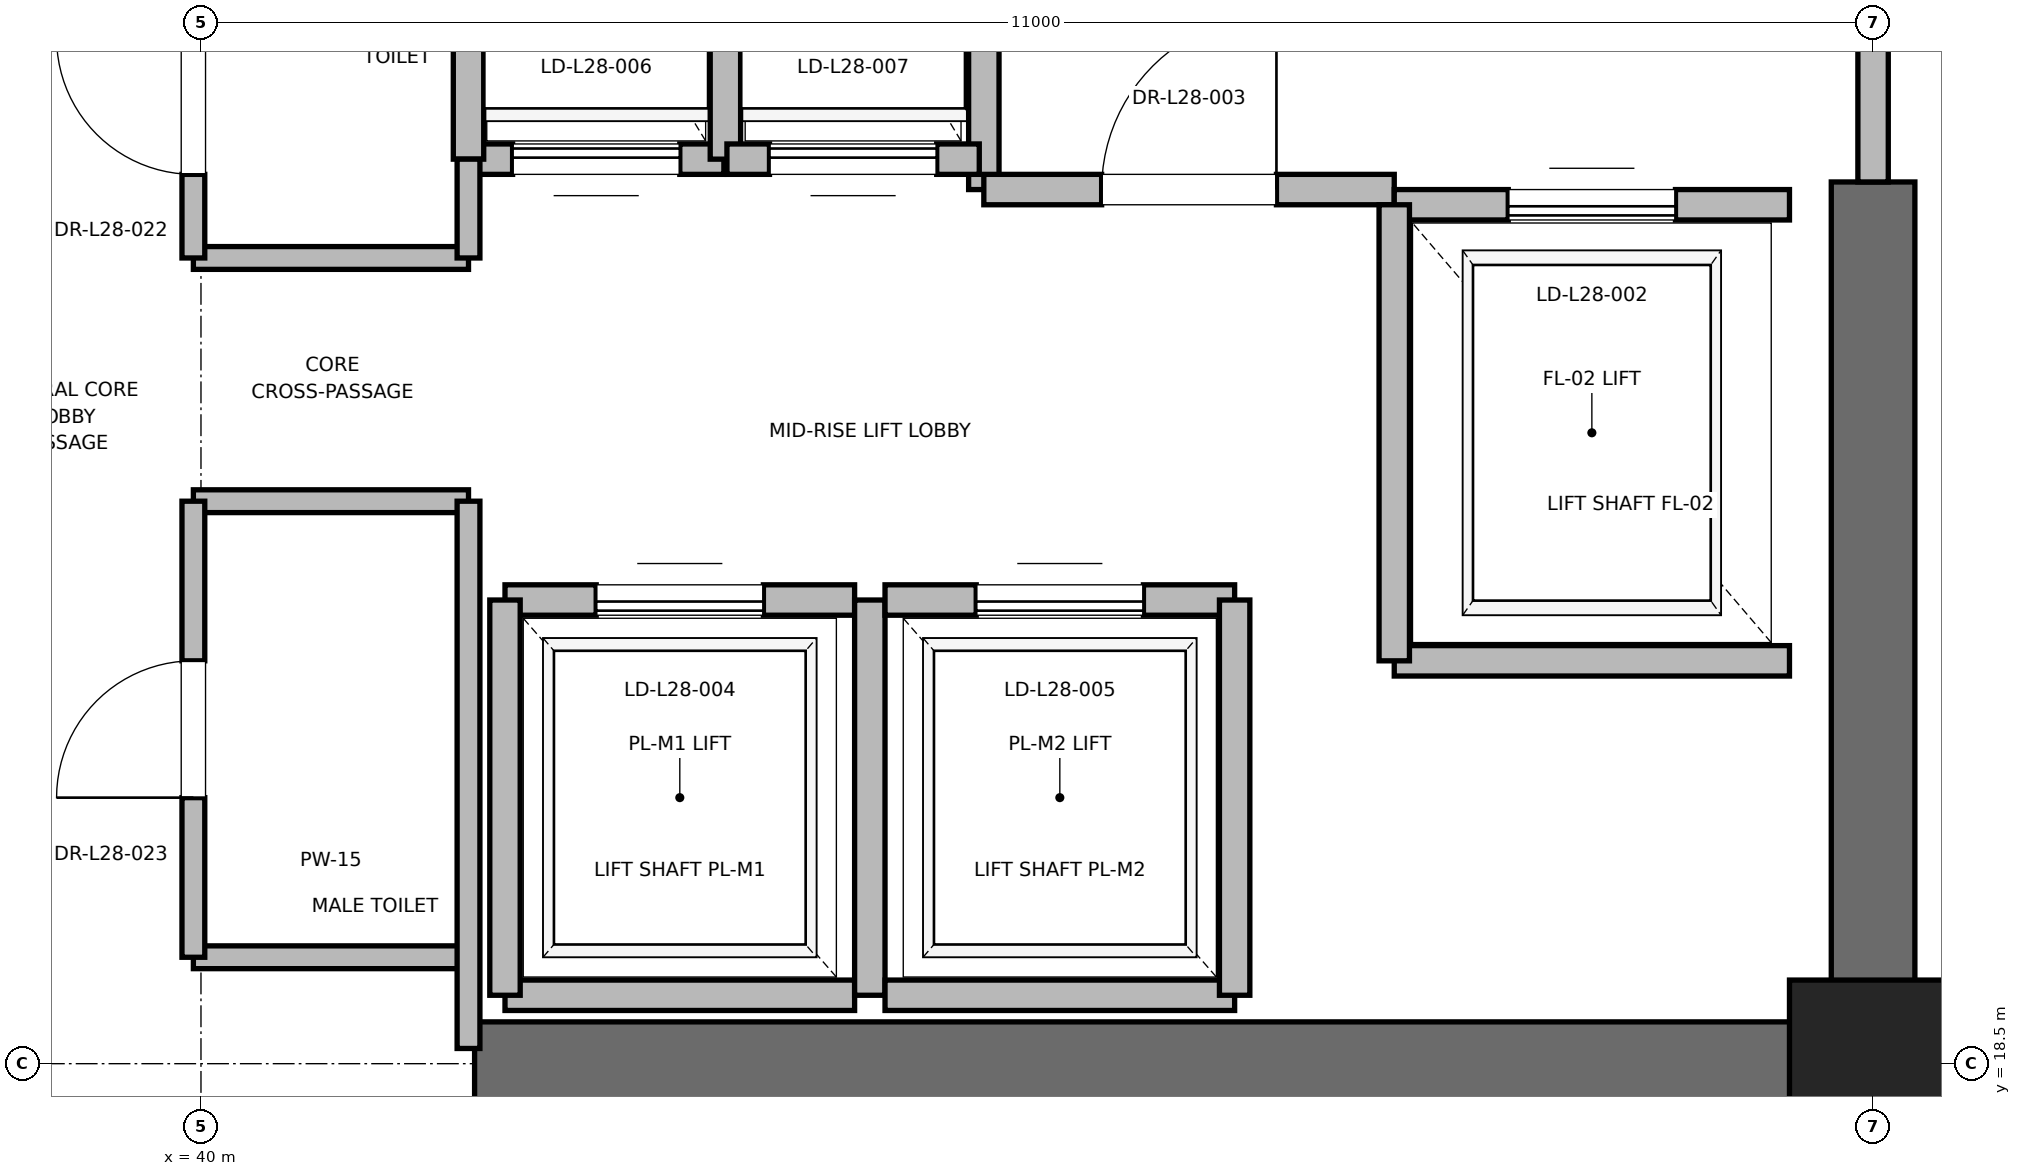
"""IFC4 building model, lengths in metres.
Left out: names, types, materials, properties, quantities, classifications, styles, units other than length and angle.
Written with IfcOpenShell. Run it as: python <this file> out.ifc"""

import sys

from ifc_helpers import new_model, si_unit, direction, frame, frame_2d, origin, origin_2d, place, context, subcontext, project, spatial, rectangle, extrude, element, fill, save


model = new_model("IFC4")
c1 = context("Model", 3, precision=1e-05, world=origin(), true_north=direction((0.0, 1.0)))
c2 = subcontext(c1, "Body", "Model", "MODEL_VIEW")
j1 = project(units=[si_unit("LENGTHUNIT", "METRE"), si_unit("PLANEANGLEUNIT", "RADIAN")], contexts=[c1])
p1 = place(None, origin())
s1 = spatial("IfcSite", under=j1, at=p1, CompositionType="ELEMENT")
p2 = place(p1, origin())
s2 = spatial("IfcBuilding", under=s1, at=p2, CompositionType="ELEMENT")
p3 = place(p2, frame((0.0, 0.0, 123.4)))
s3 = spatial("IfcBuildingStorey", under=s2, at=p3, CompositionType="ELEMENT", Elevation=123.4)
p4 = place(p3, frame((51.0, 18.5, 0.0), z_axis=(0.0, 0.0, 1.0), x_axis=(1.0, 0.0, 0.0)))
e1 = element("IfcColumn", 1, at=p4, inside=s3, PredefinedType="PILASTER", context=c2, shape_type="SweptSolid", body=[
    extrude(rectangle(XDim=1.1, YDim=1.1, at=origin_2d()), origin(), (0.0, 0.0, 1.0), 5.0),
])
p5 = place(p3, frame((41.8, 18.5, 0.0), z_axis=(0.0, 0.0, 1.0), x_axis=(1.0, 0.0, 0.0)))
e2 = element("IfcWall", 2, at=p5, inside=s3, PredefinedType="SHEAR", context=c2, shape_type="SweptSolid", body=[
    extrude(rectangle(XDim=9.2, YDim=0.55, at=frame_2d((4.6, 0.0))), origin(), (0.0, 0.0, 1.0), 4.775),
])
p6 = place(p3, frame((51.0, 18.5, 0.0), z_axis=(0.0, 0.0, 1.0), x_axis=(0.0, 1.0, 0.0)))
e3 = element("IfcWall", 3, at=p6, inside=s3, PredefinedType="SHEAR", context=c2, shape_type="SweptSolid", body=[
    extrude(rectangle(XDim=5.8, YDim=0.55, at=frame_2d((2.9, 0.0))), origin(), (0.0, 0.0, 1.0), 4.775),
])
p7 = place(p3, frame((45.15, 24.25, 0.0), z_axis=(0.0, 0.0, 1.0), x_axis=(0.0, 1.0, 0.0)))
e4 = element("IfcWall", 4, at=p7, inside=s3, PredefinedType="PARTITIONING", context=c2, shape_type="SweptSolid", body=[
    extrude(rectangle(XDim=3.37, YDim=0.2, at=frame_2d((1.685, 0.0))), origin(), (0.0, 0.0, 1.0), 4.775),
])
p8 = place(p3, frame((45.15, 24.25, 0.0), z_axis=(0.0, 0.0, 1.0), x_axis=(1.0, 0.0, 0.0)))
e5 = element("IfcWall", 5, at=p8, inside=s3, PredefinedType="PARTITIONING", context=c2, shape_type="SweptSolid", body=[
    extrude(rectangle(XDim=2.7, YDim=0.2, at=frame_2d((1.35, 0.0))), origin(), (0.0, 0.0, 1.0), 4.775),
])
p9 = place(p8, frame((0.775, 0.0, 0.0)))
e6 = element("IfcOpeningElement", 6, at=p9, cuts=e5, PredefinedType="OPENING", context=c2, shape_type="SweptSolid", body=[
    extrude(rectangle(XDim=1.15, YDim=2.2, at=frame_2d((0.575, 1.1))), frame((0.0, 0.1, 0.0), z_axis=(0.0, -1.0, 0.0), x_axis=(1.0, 0.0, 0.0)), (0.0, 0.0, 1.0), 0.2),
])
p10 = place(p3, frame((51.0, 24.3, 0.0), z_axis=(0.0, 0.0, 1.0), x_axis=(0.0, 1.0, 0.0)))
e7 = element("IfcWall", 7, at=p10, inside=s3, PredefinedType="PARTITIONING", context=c2, shape_type="SweptSolid", body=[
    extrude(rectangle(XDim=3.4, YDim=0.2, at=frame_2d((1.7, 0.0))), origin(), (0.0, 0.0, 1.0), 3.755),
])
p11 = place(p10, frame((1.125, 0.0, 0.0)))
e8 = element("IfcOpeningElement", 8, at=p11, cuts=e7, PredefinedType="OPENING", context=c2, shape_type="SweptSolid", body=[
    extrude(rectangle(XDim=1.15, YDim=2.2, at=frame_2d((0.575, 1.1))), frame((0.0, 0.1, 0.0), z_axis=(0.0, -1.0, 0.0), x_axis=(1.0, 0.0, 0.0)), (0.0, 0.0, 1.0), 0.2),
])
p12 = place(p3, frame((47.85, 21.15, 0.0), z_axis=(0.0, 0.0, 1.0), x_axis=(1.0, 0.0, 0.0)))
e9 = element("IfcWall", 9, at=p12, inside=s3, PredefinedType="SOLIDWALL", context=c2, shape_type="SweptSolid", body=[
    extrude(rectangle(XDim=2.6, YDim=0.2, at=frame_2d((1.3, 0.0))), origin(), (0.0, 0.0, 1.0), 4.775),
])
p13 = place(p3, frame((50.45, 24.15, 0.0), z_axis=(0.0, 0.0, 1.0), x_axis=(-1.0, 0.0, 0.0)))
e10 = element("IfcWall", 10, at=p13, inside=s3, PredefinedType="SOLIDWALL", context=c2, shape_type="SweptSolid", body=[
    extrude(rectangle(XDim=2.6, YDim=0.2, at=frame_2d((1.3, 0.0))), origin(), (0.0, 0.0, 1.0), 3.755),
])
p14 = place(p13, frame((0.75, 0.0, 0.0)))
e11 = element("IfcOpeningElement", 11, at=p14, cuts=e10, PredefinedType="OPENING", context=c2, shape_type="SweptSolid", body=[
    extrude(rectangle(XDim=1.1, YDim=2.2, at=frame_2d((0.55, 1.1))), frame((0.0, 0.1, 0.0), z_axis=(0.0, -1.0, 0.0), x_axis=(1.0, 0.0, 0.0)), (0.0, 0.0, 1.0), 0.2),
])
p15 = place(p3, frame((47.85, 24.15, 0.0), z_axis=(0.0, 0.0, 1.0), x_axis=(0.0, -1.0, 0.0)))
e12 = element("IfcWall", 12, at=p15, inside=s3, PredefinedType="SOLIDWALL", context=c2, shape_type="SweptSolid", body=[
    extrude(rectangle(XDim=3.0, YDim=0.2, at=frame_2d((1.5, 0.0))), origin(), (0.0, 0.0, 1.0), 4.775),
])
p16 = place(p3, frame((42.0, 18.95, 0.0), z_axis=(0.0, 0.0, 1.0), x_axis=(1.0, 0.0, 0.0)))
e13 = element("IfcWall", 13, at=p16, inside=s3, PredefinedType="SOLIDWALL", context=c2, shape_type="SweptSolid", body=[
    extrude(rectangle(XDim=2.3, YDim=0.2, at=frame_2d((1.15, 0.0))), origin(), (0.0, 0.0, 1.0), 3.755),
])
p17 = place(p3, frame((44.3, 21.55, 0.0), z_axis=(0.0, 0.0, 1.0), x_axis=(-1.0, 0.0, 0.0)))
e14 = element("IfcWall", 14, at=p17, inside=s3, PredefinedType="SOLIDWALL", context=c2, shape_type="SweptSolid", body=[
    extrude(rectangle(XDim=2.3, YDim=0.2, at=frame_2d((1.15, 0.0))), origin(), (0.0, 0.0, 1.0), 4.775),
])
p18 = place(p17, frame((0.6, 0.0, 0.0)))
e15 = element("IfcOpeningElement", 15, at=p18, cuts=e14, PredefinedType="OPENING", context=c2, shape_type="SweptSolid", body=[
    extrude(rectangle(XDim=1.1, YDim=2.2, at=frame_2d((0.55, 1.1))), frame((0.0, 0.1, 0.0), z_axis=(0.0, -1.0, 0.0), x_axis=(1.0, 0.0, 0.0)), (0.0, 0.0, 1.0), 0.2),
])
p19 = place(p3, frame((42.0, 21.55, 0.0), z_axis=(0.0, 0.0, 1.0), x_axis=(0.0, -1.0, 0.0)))
e16 = element("IfcWall", 16, at=p19, inside=s3, PredefinedType="SOLIDWALL", context=c2, shape_type="SweptSolid", body=[
    extrude(rectangle(XDim=2.6, YDim=0.2, at=frame_2d((1.3, 0.0))), origin(), (0.0, 0.0, 1.0), 3.755),
])
p20 = place(p3, frame((44.4, 18.95, 0.0), z_axis=(0.0, 0.0, 1.0), x_axis=(0.0, 1.0, 0.0)))
e17 = element("IfcWall", 17, at=p20, inside=s3, PredefinedType="SOLIDWALL", context=c2, shape_type="SweptSolid", body=[
    extrude(rectangle(XDim=2.6, YDim=0.2, at=frame_2d((1.3, 0.0))), origin(), (0.0, 0.0, 1.0), 4.775),
])
p21 = place(p3, frame((44.5, 18.95, 0.0), z_axis=(0.0, 0.0, 1.0), x_axis=(1.0, 0.0, 0.0)))
e18 = element("IfcWall", 18, at=p21, inside=s3, PredefinedType="SOLIDWALL", context=c2, shape_type="SweptSolid", body=[
    extrude(rectangle(XDim=2.3, YDim=0.2, at=frame_2d((1.15, 0.0))), origin(), (0.0, 0.0, 1.0), 4.775),
])
p22 = place(p3, frame((46.8, 21.55, 0.0), z_axis=(0.0, 0.0, 1.0), x_axis=(-1.0, 0.0, 0.0)))
e19 = element("IfcWall", 19, at=p22, inside=s3, PredefinedType="SOLIDWALL", context=c2, shape_type="SweptSolid", body=[
    extrude(rectangle(XDim=2.3, YDim=0.2, at=frame_2d((1.15, 0.0))), origin(), (0.0, 0.0, 1.0), 4.775),
])
p23 = place(p22, frame((0.6, 0.0, 0.0)))
e20 = element("IfcOpeningElement", 20, at=p23, cuts=e19, PredefinedType="OPENING", context=c2, shape_type="SweptSolid", body=[
    extrude(rectangle(XDim=1.1, YDim=2.2, at=frame_2d((0.55, 1.1))), frame((0.0, 0.1, 0.0), z_axis=(0.0, -1.0, 0.0), x_axis=(1.0, 0.0, 0.0)), (0.0, 0.0, 1.0), 0.2),
])
p24 = place(p3, frame((46.8, 18.95, 0.0), z_axis=(0.0, 0.0, 1.0), x_axis=(0.0, 1.0, 0.0)))
e21 = element("IfcWall", 21, at=p24, inside=s3, PredefinedType="SOLIDWALL", context=c2, shape_type="SweptSolid", body=[
    extrude(rectangle(XDim=2.6, YDim=0.2, at=frame_2d((1.3, 0.0))), origin(), (0.0, 0.0, 1.0), 4.775),
])
p25 = place(p3, frame((41.76, 24.45, 0.0), z_axis=(0.0, 0.0, 1.0), x_axis=(1.0, 0.0, 0.0)))
e22 = element("IfcWall", 22, at=p25, inside=s3, PredefinedType="SOLIDWALL", context=c2, shape_type="SweptSolid", body=[
    extrude(rectangle(XDim=1.68, YDim=0.2, at=frame_2d((0.84, 0.0))), origin(), (0.0, 0.0, 1.0), 4.775),
])
p26 = place(p25, frame((0.29, 0.0, 0.0)))
e23 = element("IfcOpeningElement", 23, at=p26, cuts=e22, PredefinedType="OPENING", context=c2, shape_type="SweptSolid", body=[
    extrude(rectangle(XDim=1.1, YDim=2.2, at=frame_2d((0.55, 1.1))), frame((0.0, 0.1, 0.0), z_axis=(0.0, -1.0, 0.0), x_axis=(1.0, 0.0, 0.0)), (0.0, 0.0, 1.0), 0.2),
])
for number, where, z_axis, x_axis in (
    (24, (41.76, 27.05, 0.0), (0.0, 0.0, 1.0), (0.0, -1.0, 0.0)),
    (25, (43.45, 24.45, 0.0), (0.0, 0.0, 1.0), (0.0, 1.0, 0.0)),
):
    element("IfcWall", number, at=place(p3, frame(where, z_axis=z_axis, x_axis=x_axis)), inside=s3, PredefinedType="SOLIDWALL", context=c2, shape_type="SweptSolid", body=[
        extrude(rectangle(XDim=2.6, YDim=0.2, at=frame_2d((1.3, 0.0))), origin(), (0.0, 0.0, 1.0), 4.775),
    ])
p27 = place(p3, frame((43.46, 24.45, 0.0), z_axis=(0.0, 0.0, 1.0), x_axis=(1.0, 0.0, 0.0)))
e26 = element("IfcWall", 26, at=p27, inside=s3, PredefinedType="SOLIDWALL", context=c2, shape_type="SweptSolid", body=[
    extrude(rectangle(XDim=1.66, YDim=0.2, at=frame_2d((0.83, 0.0))), origin(), (0.0, 0.0, 1.0), 4.775),
])
p28 = place(p27, frame((0.28, 0.0, 0.0)))
e27 = element("IfcOpeningElement", 27, at=p28, cuts=e26, PredefinedType="OPENING", context=c2, shape_type="SweptSolid", body=[
    extrude(rectangle(XDim=1.1, YDim=2.2, at=frame_2d((0.55, 1.1))), frame((0.0, 0.1, 0.0), z_axis=(0.0, -1.0, 0.0), x_axis=(1.0, 0.0, 0.0)), (0.0, 0.0, 1.0), 0.2),
])
for number, where, z_axis, x_axis in (
    (28, (39.95, 19.2, 0.0), (0.0, 0.0, 1.0), (1.0, 0.0, 0.0)),
    (29, (39.95, 22.2, 0.0), (0.0, 0.0, 1.0), (1.0, 0.0, 0.0)),
    (30, (39.95, 23.8, 0.0), (0.0, 0.0, 1.0), (1.0, 0.0, 0.0)),
):
    element("IfcWall", number, at=place(p3, frame(where, z_axis=z_axis, x_axis=x_axis)), inside=s3, PredefinedType="PARTITIONING", context=c2, shape_type="SweptSolid", body=[
        extrude(rectangle(XDim=1.81, YDim=0.15, at=frame_2d((0.905, 0.0))), origin(), (0.0, 0.0, 1.0), 2.85),
    ])
p29 = place(p3, frame((41.76, 18.6, 0.0), z_axis=(0.0, 0.0, 1.0), x_axis=(0.0, 1.0, 0.0)))
e31 = element("IfcWall", 31, at=p29, inside=s3, PredefinedType="PARTITIONING", context=c2, shape_type="SweptSolid", body=[
    extrude(rectangle(XDim=3.6, YDim=0.15, at=frame_2d((1.8, 0.0))), origin(), (0.0, 0.0, 1.0), 2.85),
])
p30 = place(p3, frame((41.76, 23.8, 0.0), z_axis=(0.0, 0.0, 1.0), x_axis=(0.0, 1.0, 0.0)))
e32 = element("IfcWall", 32, at=p30, inside=s3, PredefinedType="PARTITIONING", context=c2, shape_type="SweptSolid", body=[
    extrude(rectangle(XDim=0.65, YDim=0.15, at=frame_2d((0.325, 0.0))), origin(), (0.0, 0.0, 1.0), 2.85),
])
p31 = place(p3, frame((39.95, 19.2, 0.0), z_axis=(0.0, 0.0, 1.0), x_axis=(0.0, 1.0, 0.0)))
e33 = element("IfcWall", 33, at=p31, inside=s3, PredefinedType="PARTITIONING", context=c2, shape_type="SweptSolid", body=[
    extrude(rectangle(XDim=3.0, YDim=0.15, at=frame_2d((1.5, 0.0))), origin(), (0.0, 0.0, 1.0), 2.85),
])
p32 = place(p31, frame((1.05, 0.0, 0.0)))
e34 = element("IfcOpeningElement", 34, at=p32, cuts=e33, PredefinedType="OPENING", context=c2, shape_type="SweptSolid", body=[
    extrude(rectangle(XDim=0.9, YDim=2.1, at=frame_2d((0.45, 1.05))), frame((0.0, 0.075, 0.0), z_axis=(0.0, -1.0, 0.0), x_axis=(1.0, 0.0, 0.0)), (0.0, 0.0, 1.0), 0.15),
])
p33 = place(p3, frame((39.95, 23.8, 0.0), z_axis=(0.0, 0.0, 1.0), x_axis=(0.0, 1.0, 0.0)))
e35 = element("IfcWall", 35, at=p33, inside=s3, PredefinedType="PARTITIONING", context=c2, shape_type="SweptSolid", body=[
    extrude(rectangle(XDim=2.0, YDim=0.15, at=frame_2d((1.0, 0.0))), origin(), (0.0, 0.0, 1.0), 2.85),
])
p34 = place(p33, frame((0.55, 0.0, 0.0)))
e36 = element("IfcOpeningElement", 36, at=p34, cuts=e35, PredefinedType="OPENING", context=c2, shape_type="SweptSolid", body=[
    extrude(rectangle(XDim=0.9, YDim=2.1, at=frame_2d((0.45, 1.05))), frame((0.0, 0.075, 0.0), z_axis=(0.0, -1.0, 0.0), x_axis=(1.0, 0.0, 0.0)), (0.0, 0.0, 1.0), 0.15),
])
p35 = place(p9, origin())
e37 = element("IfcDoor", 37, at=p35, inside=s3, OperationType="SINGLE_SWING_RIGHT", PredefinedType="DOOR", context=c2, shape_type="SweptSolid", body=[
    extrude(rectangle(XDim=1.15, YDim=2.2, at=frame_2d((0.575, 1.1))), frame((0.0, 0.025, 0.0), z_axis=(0.0, -1.0, 0.0), x_axis=(1.0, 0.0, 0.0)), (0.0, 0.0, 1.0), 0.05),
])
fill(e6, e37)
p36 = place(p14, origin())
e38 = element("IfcDoor", 38, at=p36, inside=s3, OperationType="SLIDING_TO_RIGHT", PredefinedType="DOOR", context=c2, shape_type="SweptSolid", body=[
    extrude(rectangle(XDim=1.1, YDim=2.2, at=frame_2d((0.55, 1.1))), frame((0.0, 0.025, 0.0), z_axis=(0.0, -1.0, 0.0), x_axis=(1.0, 0.0, 0.0)), (0.0, 0.0, 1.0), 0.05),
])
fill(e11, e38)
p37 = place(p18, origin())
e39 = element("IfcDoor", 39, at=p37, inside=s3, OperationType="SLIDING_TO_RIGHT", PredefinedType="DOOR", context=c2, shape_type="SweptSolid", body=[
    extrude(rectangle(XDim=1.1, YDim=2.2, at=frame_2d((0.55, 1.1))), frame((0.0, 0.025, 0.0), z_axis=(0.0, -1.0, 0.0), x_axis=(1.0, 0.0, 0.0)), (0.0, 0.0, 1.0), 0.05),
])
fill(e15, e39)
p38 = place(p23, origin())
e40 = element("IfcDoor", 40, at=p38, inside=s3, OperationType="SLIDING_TO_RIGHT", PredefinedType="DOOR", context=c2, shape_type="SweptSolid", body=[
    extrude(rectangle(XDim=1.1, YDim=2.2, at=frame_2d((0.55, 1.1))), frame((0.0, 0.025, 0.0), z_axis=(0.0, -1.0, 0.0), x_axis=(1.0, 0.0, 0.0)), (0.0, 0.0, 1.0), 0.05),
])
fill(e20, e40)
p39 = place(p26, origin())
e41 = element("IfcDoor", 41, at=p39, inside=s3, OperationType="SLIDING_TO_RIGHT", PredefinedType="DOOR", context=c2, shape_type="SweptSolid", body=[
    extrude(rectangle(XDim=1.1, YDim=2.2, at=frame_2d((0.55, 1.1))), frame((0.0, 0.025, 0.0), z_axis=(0.0, -1.0, 0.0), x_axis=(1.0, 0.0, 0.0)), (0.0, 0.0, 1.0), 0.05),
])
fill(e23, e41)
p40 = place(p28, origin())
e42 = element("IfcDoor", 42, at=p40, inside=s3, OperationType="SLIDING_TO_RIGHT", PredefinedType="DOOR", context=c2, shape_type="SweptSolid", body=[
    extrude(rectangle(XDim=1.1, YDim=2.2, at=frame_2d((0.55, 1.1))), frame((0.0, 0.025, 0.0), z_axis=(0.0, -1.0, 0.0), x_axis=(1.0, 0.0, 0.0)), (0.0, 0.0, 1.0), 0.05),
])
fill(e27, e42)
p41 = place(p32, origin())
e43 = element("IfcDoor", 43, at=p41, inside=s3, OperationType="SINGLE_SWING_LEFT", PredefinedType="DOOR", context=c2, shape_type="SweptSolid", body=[
    extrude(rectangle(XDim=0.9, YDim=2.1, at=frame_2d((0.45, 1.05))), frame((0.0, 0.025, 0.0), z_axis=(0.0, -1.0, 0.0), x_axis=(1.0, 0.0, 0.0)), (0.0, 0.0, 1.0), 0.05),
])
fill(e34, e43)
p42 = place(p34, origin())
e44 = element("IfcDoor", 44, at=p42, inside=s3, OperationType="SINGLE_SWING_RIGHT", PredefinedType="DOOR", context=c2, shape_type="SweptSolid", body=[
    extrude(rectangle(XDim=0.9, YDim=2.1, at=frame_2d((0.45, 1.05))), frame((0.0, 0.025, 0.0), z_axis=(0.0, -1.0, 0.0), x_axis=(1.0, 0.0, 0.0)), (0.0, 0.0, 1.0), 0.05),
])
fill(e36, e44)
save(model, sys.argv[1])
